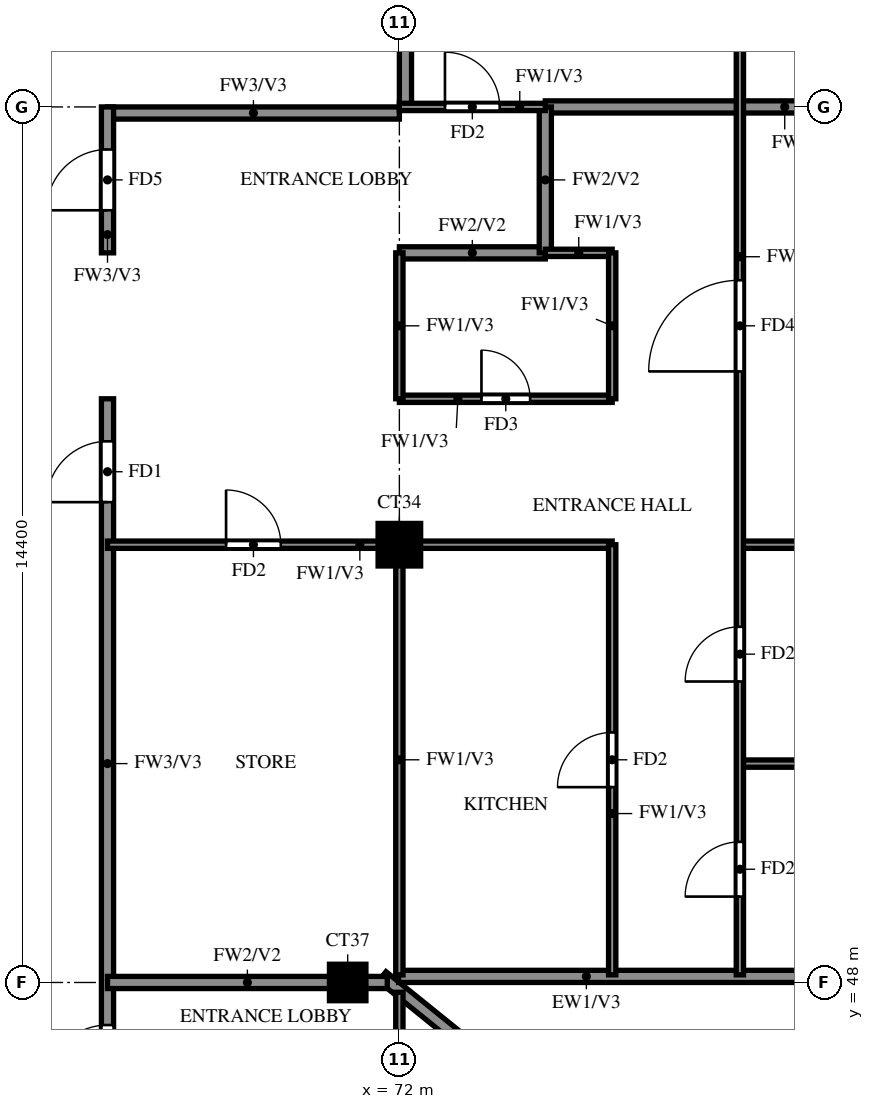
"""IFC4 building model, lengths in metres.
Left out: names, types, materials, properties, quantities, classifications, styles, units other than length and angle.
Written with IfcOpenShell. Run it as: python <this file> out.ifc"""

import sys

from ifc_helpers import new_model, si_unit, direction, frame, frame_2d, origin, origin_2d, place, context, subcontext, project, spatial, rectangle, extrude, source, transform, mapped, element, fill, save


model = new_model("IFC4")
c1 = context("Model", 3, precision=1e-05, world=origin(), true_north=direction((0.0, 1.0)))
c2 = subcontext(c1, "Body", "Model", "MODEL_VIEW")
j1 = project(units=[si_unit("LENGTHUNIT", "METRE"), si_unit("PLANEANGLEUNIT", "RADIAN")], contexts=[c1])
p1 = place(None, origin())
s1 = spatial("IfcSite", under=j1, at=p1, CompositionType="ELEMENT")
p2 = place(p1, origin())
s2 = spatial("IfcBuilding", under=s1, at=p2, CompositionType="ELEMENT")
p3 = place(p2, frame((0.0, 0.0, 253.5)))
s3 = spatial("IfcBuildingStorey", under=s2, at=p3, CompositionType="ELEMENT", Elevation=253.5)
m1 = source(origin(), c2, "Body", "SweptSolid", [
    extrude(rectangle(XDim=0.6, YDim=0.6, at=origin_2d()), origin(), (0.0, 0.0, 1.0), 3.22),
])
p4 = place(p3, frame((71.15, 48.0, 0.0), z_axis=(0.0, 0.0, 1.0), x_axis=(1.0, 0.0, 0.0)))
e1 = element("IfcColumn", 1, at=p4, inside=s3, PredefinedType="COLUMN", context=c2, shape_type="MappedRepresentation", body=[
    mapped(m1, transform((0.0, 0.0, 0.0))),
])
m2 = source(origin(), c2, "Body", "SweptSolid", [
    extrude(rectangle(XDim=0.7, YDim=0.7, at=origin_2d()), origin(), (0.0, 0.0, 1.0), 3.22),
])
p5 = place(p3, frame((72.0, 55.2, 0.0), z_axis=(0.0, 0.0, 1.0), x_axis=(1.0, 0.0, 0.0)))
e2 = element("IfcColumn", 2, at=p5, inside=s3, PredefinedType="COLUMN", context=c2, shape_type="MappedRepresentation", body=[
    mapped(m2, transform((0.0, 0.0, 0.0))),
])
p6 = place(p3, frame((81.907, 39.87, 0.0), z_axis=(0.0, 0.0, 1.0), x_axis=(-0.777936274417, 0.62834318087, 0.0)))
e3 = element("IfcWall", 3, at=p6, inside=s3, PredefinedType="SOLIDWALL", context=c2, shape_type="SweptSolid", body=[
    extrude(rectangle(XDim=13.099, YDim=0.2, at=frame_2d((6.549, 0.0))), origin(), (0.0, 0.0, 1.0), 3.22),
])
p7 = place(p6, frame((9.938, 0.0, 1.5)))
e4 = element("IfcOpeningElement", 4, at=p7, cuts=e3, PredefinedType="OPENING", context=c2, shape_type="SweptSolid", body=[
    extrude(rectangle(XDim=0.9, YDim=0.9, at=frame_2d((0.45, 0.45))), frame((0.0, 0.11, 0.0), z_axis=(0.0, -1.0, 0.0), x_axis=(1.0, 0.0, 0.0)), (0.0, 0.0, 1.0), 0.22),
])
p8 = place(p3, frame((71.987, 48.1, 0.0), z_axis=(0.0, 0.0, 1.0), x_axis=(1.0, 0.0, 0.0)))
e5 = element("IfcWall", 5, at=p8, inside=s3, PredefinedType="SOLIDWALL", context=c2, shape_type="SweptSolid", body=[
    extrude(rectangle(XDim=6.863, YDim=0.2, at=frame_2d((3.432, 0.0))), origin(), (0.0, 0.0, 1.0), 3.22),
])
p9 = place(p3, frame((67.2, 62.3, 0.0), z_axis=(0.0, 0.0, 1.0), x_axis=(1.0, 0.0, 0.0)))
e6 = element("IfcWall", 6, at=p9, inside=s3, PredefinedType="SOLIDWALL", context=c2, shape_type="SweptSolid", body=[
    extrude(rectangle(XDim=4.8, YDim=0.2, at=frame_2d((2.4, 0.0))), origin(), (0.0, 0.0, 1.0), 3.22),
])
p10 = place(p3, frame((67.2, 45.6, 0.0), z_axis=(0.0, 0.0, 1.0), x_axis=(0.0, 1.0, 0.0)))
e7 = element("IfcWall", 7, at=p10, inside=s3, PredefinedType="SOLIDWALL", context=c2, shape_type="SweptSolid", body=[
    extrude(rectangle(XDim=12.0, YDim=0.2, at=frame_2d((6.0, 0.0))), origin(), (0.0, 0.0, 1.0), 3.22),
])
p11 = place(p10, frame((10.3, 0.0, 0.0)))
e8 = element("IfcOpeningElement", 8, at=p11, cuts=e7, PredefinedType="OPENING", context=c2, shape_type="SweptSolid", body=[
    extrude(rectangle(XDim=1.0, YDim=2.1, at=frame_2d((0.5, 1.05))), frame((0.0, 0.11, 0.0), z_axis=(0.0, -1.0, 0.0), x_axis=(1.0, 0.0, 0.0)), (0.0, 0.0, 1.0), 0.22),
])
p12 = place(p10, frame((0.7, 0.0, 0.0)))
e9 = element("IfcOpeningElement", 9, at=p12, cuts=e7, PredefinedType="OPENING", context=c2, shape_type="SweptSolid", body=[
    extrude(rectangle(XDim=1.0, YDim=2.1, at=frame_2d((0.5, 1.05))), frame((0.0, 0.11, 0.0), z_axis=(0.0, -1.0, 0.0), x_axis=(1.0, 0.0, 0.0)), (0.0, 0.0, 1.0), 0.22),
])
p13 = place(p3, frame((67.2, 60.0, 0.0), z_axis=(0.0, 0.0, 1.0), x_axis=(0.0, 1.0, 0.0)))
e10 = element("IfcWall", 10, at=p13, inside=s3, PredefinedType="SOLIDWALL", context=c2, shape_type="SweptSolid", body=[
    extrude(rectangle(XDim=2.4, YDim=0.2, at=frame_2d((1.2, 0.0))), origin(), (0.0, 0.0, 1.0), 3.22),
])
p14 = place(p13, frame((0.7, 0.0, 0.0)))
e11 = element("IfcOpeningElement", 11, at=p14, cuts=e10, PredefinedType="OPENING", context=c2, shape_type="SweptSolid", body=[
    extrude(rectangle(XDim=1.0, YDim=2.1, at=frame_2d((0.5, 1.05))), frame((0.0, 0.11, 0.0), z_axis=(0.0, -1.0, 0.0), x_axis=(1.0, 0.0, 0.0)), (0.0, 0.0, 1.0), 0.22),
])
p15 = place(p3, frame((72.1, 62.4, 0.0), z_axis=(0.0, 0.0, 1.0), x_axis=(0.0, 1.0, 0.0)))
e12 = element("IfcWall", 12, at=p15, inside=s3, PredefinedType="SOLIDWALL", context=c2, shape_type="SweptSolid", body=[
    extrude(rectangle(XDim=15.6, YDim=0.2, at=frame_2d((7.8, 0.0))), origin(), (0.0, 0.0, 1.0), 3.22),
])
p16 = place(p3, frame((67.2, 48.0, 0.0), z_axis=(0.0, 0.0, 1.0), x_axis=(1.0, 0.0, 0.0)))
e13 = element("IfcWall", 13, at=p16, inside=s3, PredefinedType="SOLIDWALL", context=c2, shape_type="SweptSolid", body=[
    extrude(rectangle(XDim=4.601, YDim=0.2, at=frame_2d((2.301, 0.0))), origin(), (0.0, 0.0, 1.0), 3.22),
])
p17 = place(p3, frame((72.0, 60.0, 0.0), z_axis=(0.0, 0.0, 1.0), x_axis=(1.0, 0.0, 0.0)))
e14 = element("IfcWall", 14, at=p17, inside=s3, PredefinedType="SOLIDWALL", context=c2, shape_type="SweptSolid", body=[
    extrude(rectangle(XDim=2.4, YDim=0.2, at=frame_2d((1.2, 0.0))), origin(), (0.0, 0.0, 1.0), 3.22),
])
p18 = place(p3, frame((74.4, 62.4, 0.0), z_axis=(0.0, 0.0, 1.0), x_axis=(1.0, 0.0, 0.0)))
e15 = element("IfcWall", 15, at=p18, inside=s3, PredefinedType="SOLIDWALL", context=c2, shape_type="SweptSolid", body=[
    extrude(rectangle(XDim=7.875, YDim=0.2, at=frame_2d((3.938, 0.0))), origin(), (0.0, 0.0, 1.0), 3.22),
])
p19 = place(p3, frame((74.4, 60.0, 0.0), z_axis=(0.0, 0.0, 1.0), x_axis=(0.0, 1.0, 0.0)))
e16 = element("IfcWall", 16, at=p19, inside=s3, PredefinedType="SOLIDWALL", context=c2, shape_type="SweptSolid", body=[
    extrude(rectangle(XDim=2.4, YDim=0.2, at=frame_2d((1.2, 0.0))), origin(), (0.0, 0.0, 1.0), 3.22),
])
p20 = place(p3, frame((77.6, 51.6, 0.0), z_axis=(0.0, 0.0, 1.0), x_axis=(1.0, 0.0, 0.0)))
e17 = element("IfcWall", 17, at=p20, inside=s3, PredefinedType="PARTITIONING", context=c2, shape_type="SweptSolid", body=[
    extrude(rectangle(XDim=4.675, YDim=0.12, at=frame_2d((2.337, 0.0))), origin(), (0.0, 0.0, 1.0), 2.32),
])
p21 = place(p3, frame((67.2, 55.2, 0.0), z_axis=(0.0, 0.0, 1.0), x_axis=(1.0, 0.0, 0.0)))
e18 = element("IfcWall", 18, at=p21, inside=s3, PredefinedType="PARTITIONING", context=c2, shape_type="SweptSolid", body=[
    extrude(rectangle(XDim=8.3, YDim=0.12, at=frame_2d((4.15, 0.0))), origin(), (0.0, 0.0, 1.0), 3.22),
])
p22 = place(p21, frame((1.95, 0.0, 0.0)))
e19 = element("IfcOpeningElement", 19, at=p22, cuts=e18, PredefinedType="OPENING", context=c2, shape_type="SweptSolid", body=[
    extrude(rectangle(XDim=0.9, YDim=2.1, at=frame_2d((0.45, 1.05))), frame((0.0, 0.07, 0.0), z_axis=(0.0, -1.0, 0.0), x_axis=(1.0, 0.0, 0.0)), (0.0, 0.0, 1.0), 0.14),
])
p23 = place(p3, frame((77.6, 55.2, 0.0), z_axis=(0.0, 0.0, 1.0), x_axis=(1.0, 0.0, 0.0)))
e20 = element("IfcWall", 20, at=p23, inside=s3, PredefinedType="PARTITIONING", context=c2, shape_type="SweptSolid", body=[
    extrude(rectangle(XDim=4.675, YDim=0.12, at=frame_2d((2.337, 0.0))), origin(), (0.0, 0.0, 1.0), 3.22),
])
p24 = place(p3, frame((72.0, 57.6, 0.0), z_axis=(0.0, 0.0, 1.0), x_axis=(1.0, 0.0, 0.0)))
e21 = element("IfcWall", 21, at=p24, inside=s3, PredefinedType="PARTITIONING", context=c2, shape_type="SweptSolid", body=[
    extrude(rectangle(XDim=3.5, YDim=0.12, at=frame_2d((1.75, 0.0))), origin(), (0.0, 0.0, 1.0), 3.22),
])
p25 = place(p24, frame((1.35, 0.0, 0.0)))
e22 = element("IfcOpeningElement", 22, at=p25, cuts=e21, PredefinedType="OPENING", context=c2, shape_type="SweptSolid", body=[
    extrude(rectangle(XDim=0.8, YDim=2.1, at=frame_2d((0.4, 1.05))), frame((0.0, 0.07, 0.0), z_axis=(0.0, -1.0, 0.0), x_axis=(1.0, 0.0, 0.0)), (0.0, 0.0, 1.0), 0.14),
])
p26 = place(p3, frame((74.4, 60.0, 0.0), z_axis=(0.0, 0.0, 1.0), x_axis=(1.0, 0.0, 0.0)))
e23 = element("IfcWall", 23, at=p26, inside=s3, PredefinedType="PARTITIONING", context=c2, shape_type="SweptSolid", body=[
    extrude(rectangle(XDim=1.1, YDim=0.12, at=frame_2d((0.55, 0.0))), origin(), (0.0, 0.0, 1.0), 3.22),
])
p27 = place(p3, frame((72.0, 62.4, 0.0), z_axis=(0.0, 0.0, 1.0), x_axis=(1.0, 0.0, 0.0)))
e24 = element("IfcWall", 24, at=p27, inside=s3, PredefinedType="PARTITIONING", context=c2, shape_type="SweptSolid", body=[
    extrude(rectangle(XDim=2.4, YDim=0.12, at=frame_2d((1.2, 0.0))), origin(), (0.0, 0.0, 1.0), 3.22),
])
p28 = place(p27, frame((0.75, 0.0, 0.0)))
e25 = element("IfcOpeningElement", 25, at=p28, cuts=e24, PredefinedType="OPENING", context=c2, shape_type="SweptSolid", body=[
    extrude(rectangle(XDim=0.9, YDim=2.1, at=frame_2d((0.45, 1.05))), frame((0.0, 0.07, 0.0), z_axis=(0.0, -1.0, 0.0), x_axis=(1.0, 0.0, 0.0)), (0.0, 0.0, 1.0), 0.14),
])
p29 = place(p3, frame((72.0, 39.725, 0.0), z_axis=(0.0, 0.0, 1.0), x_axis=(0.0, 1.0, 0.0)))
e26 = element("IfcWall", 26, at=p29, inside=s3, PredefinedType="PARTITIONING", context=c2, shape_type="SweptSolid", body=[
    extrude(rectangle(XDim=8.114, YDim=0.12, at=frame_2d((4.057, 0.0))), origin(), (0.0, 0.0, 1.0), 2.32),
])
p30 = place(p29, frame((1.788, 0.0, 0.0)))
e27 = element("IfcOpeningElement", 27, at=p30, cuts=e26, PredefinedType="OPENING", context=c2, shape_type="SweptSolid", body=[
    extrude(rectangle(XDim=0.9, YDim=2.1, at=frame_2d((0.45, 1.05))), frame((0.0, 0.07, 0.0), z_axis=(0.0, -1.0, 0.0), x_axis=(1.0, 0.0, 0.0)), (0.0, 0.0, 1.0), 0.14),
])
p31 = place(p29, frame((4.575, 0.0, 0.0)))
e28 = element("IfcOpeningElement", 28, at=p31, cuts=e26, PredefinedType="OPENING", context=c2, shape_type="SweptSolid", body=[
    extrude(rectangle(XDim=0.8, YDim=2.1, at=frame_2d((0.4, 1.05))), frame((0.0, 0.07, 0.0), z_axis=(0.0, -1.0, 0.0), x_axis=(1.0, 0.0, 0.0)), (0.0, 0.0, 1.0), 0.14),
])
p32 = place(p3, frame((72.0, 48.125, 0.0), z_axis=(0.0, 0.0, 1.0), x_axis=(0.0, 1.0, 0.0)))
e29 = element("IfcWall", 29, at=p32, inside=s3, PredefinedType="PARTITIONING", context=c2, shape_type="SweptSolid", body=[
    extrude(rectangle(XDim=7.075, YDim=0.12, at=frame_2d((3.538, 0.0))), origin(), (0.0, 0.0, 1.0), 3.22),
])
p33 = place(p3, frame((72.0, 57.6, 0.0), z_axis=(0.0, 0.0, 1.0), x_axis=(0.0, 1.0, 0.0)))
e30 = element("IfcWall", 30, at=p33, inside=s3, PredefinedType="PARTITIONING", context=c2, shape_type="SweptSolid", body=[
    extrude(rectangle(XDim=2.4, YDim=0.12, at=frame_2d((1.2, 0.0))), origin(), (0.0, 0.0, 1.0), 3.22),
])
p34 = place(p3, frame((75.5, 48.125, 0.0), z_axis=(0.0, 0.0, 1.0), x_axis=(0.0, 1.0, 0.0)))
e31 = element("IfcWall", 31, at=p34, inside=s3, PredefinedType="PARTITIONING", context=c2, shape_type="SweptSolid", body=[
    extrude(rectangle(XDim=7.075, YDim=0.12, at=frame_2d((3.538, 0.0))), origin(), (0.0, 0.0, 1.0), 3.22),
])
p35 = place(p34, frame((3.087, 0.0, 0.0)))
e32 = element("IfcOpeningElement", 32, at=p35, cuts=e31, PredefinedType="OPENING", context=c2, shape_type="SweptSolid", body=[
    extrude(rectangle(XDim=0.9, YDim=2.1, at=frame_2d((0.45, 1.05))), frame((0.0, 0.07, 0.0), z_axis=(0.0, -1.0, 0.0), x_axis=(1.0, 0.0, 0.0)), (0.0, 0.0, 1.0), 0.14),
])
p36 = place(p3, frame((75.5, 57.6, 0.0), z_axis=(0.0, 0.0, 1.0), x_axis=(0.0, 1.0, 0.0)))
e33 = element("IfcWall", 33, at=p36, inside=s3, PredefinedType="PARTITIONING", context=c2, shape_type="SweptSolid", body=[
    extrude(rectangle(XDim=2.4, YDim=0.12, at=frame_2d((1.2, 0.0))), origin(), (0.0, 0.0, 1.0), 3.22),
])
p37 = place(p3, frame((77.6, 48.125, 0.0), z_axis=(0.0, 0.0, 1.0), x_axis=(0.0, 1.0, 0.0)))
e34 = element("IfcWall", 34, at=p37, inside=s3, PredefinedType="PARTITIONING", context=c2, shape_type="SweptSolid", body=[
    extrude(rectangle(XDim=21.475, YDim=0.12, at=frame_2d((10.738, 0.0))), origin(), (0.0, 0.0, 1.0), 3.22),
])
p38 = place(p37, frame((1.288, 0.0, 0.0)))
e35 = element("IfcOpeningElement", 35, at=p38, cuts=e34, PredefinedType="OPENING", context=c2, shape_type="SweptSolid", body=[
    extrude(rectangle(XDim=0.9, YDim=2.1, at=frame_2d((0.45, 1.05))), frame((0.0, 0.07, 0.0), z_axis=(0.0, -1.0, 0.0), x_axis=(1.0, 0.0, 0.0)), (0.0, 0.0, 1.0), 0.14),
])
p39 = place(p37, frame((4.825, 0.0, 0.0)))
e36 = element("IfcOpeningElement", 36, at=p39, cuts=e34, PredefinedType="OPENING", context=c2, shape_type="SweptSolid", body=[
    extrude(rectangle(XDim=0.9, YDim=2.1, at=frame_2d((0.45, 1.05))), frame((0.0, 0.07, 0.0), z_axis=(0.0, -1.0, 0.0), x_axis=(1.0, 0.0, 0.0)), (0.0, 0.0, 1.0), 0.14),
])
p40 = place(p37, frame((9.925, 0.0, 0.0)))
e37 = element("IfcOpeningElement", 37, at=p40, cuts=e34, PredefinedType="OPENING", context=c2, shape_type="SweptSolid", body=[
    extrude(rectangle(XDim=1.5, YDim=2.1, at=frame_2d((0.75, 1.05))), frame((0.0, 0.07, 0.0), z_axis=(0.0, -1.0, 0.0), x_axis=(1.0, 0.0, 0.0)), (0.0, 0.0, 1.0), 0.14),
])
p41 = place(p37, frame((15.625, 0.0, 0.0)))
e38 = element("IfcOpeningElement", 38, at=p41, cuts=e34, PredefinedType="OPENING", context=c2, shape_type="SweptSolid", body=[
    extrude(rectangle(XDim=0.9, YDim=2.1, at=frame_2d((0.45, 1.05))), frame((0.0, 0.07, 0.0), z_axis=(0.0, -1.0, 0.0), x_axis=(1.0, 0.0, 0.0)), (0.0, 0.0, 1.0), 0.14),
])
p42 = place(p37, frame((19.225, 0.0, 0.0)))
e39 = element("IfcOpeningElement", 39, at=p42, cuts=e34, PredefinedType="OPENING", context=c2, shape_type="SweptSolid", body=[
    extrude(rectangle(XDim=0.9, YDim=2.1, at=frame_2d((0.45, 1.05))), frame((0.0, 0.07, 0.0), z_axis=(0.0, -1.0, 0.0), x_axis=(1.0, 0.0, 0.0)), (0.0, 0.0, 1.0), 0.14),
])
p43 = place(p11, origin())
e40 = element("IfcDoor", 40, at=p43, inside=s3, OperationType="SINGLE_SWING_LEFT", PredefinedType="DOOR", context=c2, shape_type="SweptSolid", body=[
    extrude(rectangle(XDim=1.0, YDim=2.1, at=frame_2d((0.5, 1.05))), frame((0.0, 0.025, 0.0), z_axis=(0.0, -1.0, 0.0), x_axis=(1.0, 0.0, 0.0)), (0.0, 0.0, 1.0), 0.05),
])
fill(e8, e40)
p44 = place(p38, origin())
e41 = element("IfcDoor", 41, at=p44, inside=s3, OperationType="SINGLE_SWING_RIGHT", PredefinedType="DOOR", context=c2, shape_type="SweptSolid", body=[
    extrude(rectangle(XDim=0.9, YDim=2.1, at=frame_2d((0.45, 1.05))), frame((0.0, 0.025, 0.0), z_axis=(0.0, -1.0, 0.0), x_axis=(1.0, 0.0, 0.0)), (0.0, 0.0, 1.0), 0.05),
])
fill(e35, e41)
p45 = place(p39, origin())
e42 = element("IfcDoor", 42, at=p45, inside=s3, OperationType="SINGLE_SWING_LEFT", PredefinedType="DOOR", context=c2, shape_type="SweptSolid", body=[
    extrude(rectangle(XDim=0.9, YDim=2.1, at=frame_2d((0.45, 1.05))), frame((0.0, 0.025, 0.0), z_axis=(0.0, -1.0, 0.0), x_axis=(1.0, 0.0, 0.0)), (0.0, 0.0, 1.0), 0.05),
])
fill(e36, e42)
p46 = place(p40, origin())
e43 = element("IfcDoor", 43, at=p46, inside=s3, OperationType="SINGLE_SWING_LEFT", PredefinedType="DOOR", context=c2, shape_type="SweptSolid", body=[
    extrude(rectangle(XDim=1.5, YDim=2.1, at=frame_2d((0.75, 1.05))), frame((0.0, 0.025, 0.0), z_axis=(0.0, -1.0, 0.0), x_axis=(1.0, 0.0, 0.0)), (0.0, 0.0, 1.0), 0.05),
])
fill(e37, e43)
p47 = place(p35, origin())
e44 = element("IfcDoor", 44, at=p47, inside=s3, OperationType="SINGLE_SWING_RIGHT", PredefinedType="DOOR", context=c2, shape_type="SweptSolid", body=[
    extrude(rectangle(XDim=0.9, YDim=2.1, at=frame_2d((0.45, 1.05))), frame((0.0, 0.025, 0.0), z_axis=(0.0, -1.0, 0.0), x_axis=(1.0, 0.0, 0.0)), (0.0, 0.0, 1.0), 0.05),
])
fill(e32, e44)
p48 = place(p25, origin())
e45 = element("IfcDoor", 45, at=p48, inside=s3, OperationType="SINGLE_SWING_LEFT", PredefinedType="DOOR", context=c2, shape_type="SweptSolid", body=[
    extrude(rectangle(XDim=0.8, YDim=2.1, at=frame_2d((0.4, 1.05))), frame((0.0, 0.025, 0.0), z_axis=(0.0, -1.0, 0.0), x_axis=(1.0, 0.0, 0.0)), (0.0, 0.0, 1.0), 0.05),
])
fill(e22, e45)
p49 = place(p22, origin())
e46 = element("IfcDoor", 46, at=p49, inside=s3, OperationType="SINGLE_SWING_LEFT", PredefinedType="DOOR", context=c2, shape_type="SweptSolid", body=[
    extrude(rectangle(XDim=0.9, YDim=2.1, at=frame_2d((0.45, 1.05))), frame((0.0, 0.025, 0.0), z_axis=(0.0, -1.0, 0.0), x_axis=(1.0, 0.0, 0.0)), (0.0, 0.0, 1.0), 0.05),
])
fill(e19, e46)
p50 = place(p28, origin())
e47 = element("IfcDoor", 47, at=p50, inside=s3, OperationType="SINGLE_SWING_RIGHT", PredefinedType="DOOR", context=c2, shape_type="SweptSolid", body=[
    extrude(rectangle(XDim=0.9, YDim=2.1, at=frame_2d((0.45, 1.05))), frame((0.0, 0.025, 0.0), z_axis=(0.0, -1.0, 0.0), x_axis=(1.0, 0.0, 0.0)), (0.0, 0.0, 1.0), 0.05),
])
fill(e25, e47)
p51 = place(p14, origin())
e48 = element("IfcDoor", 48, at=p51, inside=s3, OperationType="SINGLE_SWING_LEFT", PredefinedType="DOOR", context=c2, shape_type="SweptSolid", body=[
    extrude(rectangle(XDim=1.0, YDim=2.1, at=frame_2d((0.5, 1.05))), frame((0.0, 0.025, 0.0), z_axis=(0.0, -1.0, 0.0), x_axis=(1.0, 0.0, 0.0)), (0.0, 0.0, 1.0), 0.05),
])
fill(e11, e48)
p52 = place(p12, origin())
e49 = element("IfcDoor", 49, at=p52, inside=s3, OperationType="SINGLE_SWING_LEFT", PredefinedType="DOOR", context=c2, shape_type="SweptSolid", body=[
    extrude(rectangle(XDim=1.0, YDim=2.1, at=frame_2d((0.5, 1.05))), frame((0.0, 0.025, 0.0), z_axis=(0.0, -1.0, 0.0), x_axis=(1.0, 0.0, 0.0)), (0.0, 0.0, 1.0), 0.05),
])
fill(e9, e49)
save(model, sys.argv[1])
